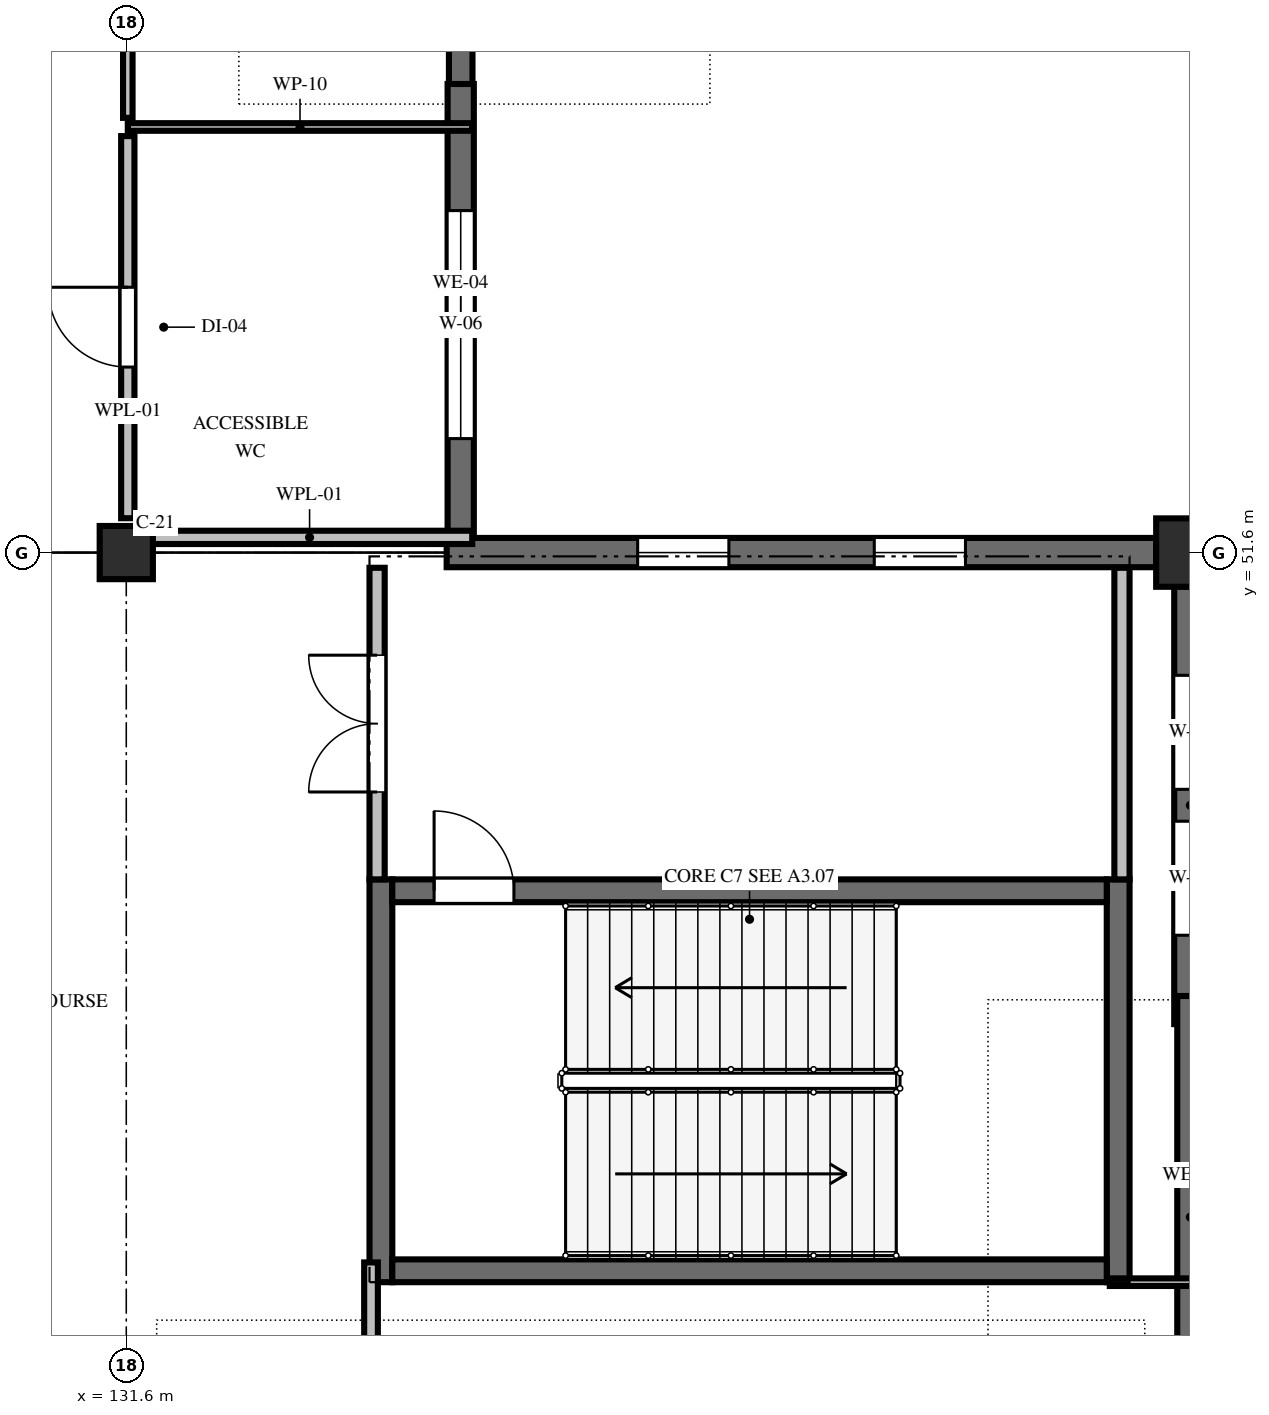
"""IFC4 building model, lengths in metres.
Left out: names, types, materials, properties, quantities, classifications, styles, units other than length and angle.
Written with IfcOpenShell. Run it as: python <this file> out.ifc"""

import sys

from ifc_helpers import new_model, si_unit, direction, frame, frame_2d, origin, origin_2d, place, context, subcontext, project, spatial, rectangle, hollow_rectangle, extrude, element, fill, save


model = new_model("IFC4")
c1 = context("Model", 3, precision=1e-05, world=origin(), true_north=direction((0.0, 1.0)))
c2 = subcontext(c1, "Body", "Model", "MODEL_VIEW")
j1 = project(units=[si_unit("LENGTHUNIT", "METRE"), si_unit("PLANEANGLEUNIT", "RADIAN")], contexts=[c1])
p1 = place(None, origin())
s1 = spatial("IfcSite", under=j1, at=p1, CompositionType="ELEMENT")
p2 = place(p1, origin())
s2 = spatial("IfcBuilding", under=s1, at=p2, CompositionType="ELEMENT")
p3 = place(p2, origin())
s3 = spatial("IfcBuildingStorey", under=s2, at=p3, CompositionType="ELEMENT", Elevation=0.0)
p4 = place(p3, frame((131.6, 51.6, 0.0), z_axis=(0.0, 0.0, 1.0), x_axis=(1.0, 0.0, 0.0)))
e1 = element("IfcColumn", 1, at=p4, inside=s3, PredefinedType="COLUMN", context=c2, shape_type="SweptSolid", body=[
    extrude(hollow_rectangle(XDim=0.7, YDim=0.7, WallThickness=0.028, InnerFilletRadius=0.028, OuterFilletRadius=0.056, at=origin_2d()), origin(), (0.0, 0.0, 1.0), 5.4),
])
p5 = place(p3, frame((145.6, 51.6, 0.0), z_axis=(0.0, 0.0, 1.0), x_axis=(1.0, 0.0, 0.0)))
e2 = element("IfcColumn", 2, at=p5, inside=s3, PredefinedType="COLUMN", context=c2, shape_type="SweptSolid", body=[
    extrude(hollow_rectangle(XDim=0.9, YDim=0.9, WallThickness=0.036, InnerFilletRadius=0.036, OuterFilletRadius=0.072, at=origin_2d()), origin(), (0.0, 0.0, 1.0), 5.4),
])
p6 = place(p3, frame((136.0, 63.749, 0.0), z_axis=(0.0, 0.0, 1.0), x_axis=(0.0, -1.0, 0.0)))
e3 = element("IfcWall", 3, at=p6, inside=s3, PredefinedType="SOLIDWALL", context=c2, shape_type="SweptSolid", body=[
    extrude(rectangle(XDim=6.298, YDim=0.31, at=frame_2d((3.149, 0.0))), origin(), (0.0, 0.0, 1.0), 3.468),
])
p7 = place(p6, frame((1.799, 0.0, 0.9)))
e4 = element("IfcOpeningElement", 4, at=p7, cuts=e3, PredefinedType="OPENING", context=c2, shape_type="SweptSolid", body=[
    extrude(rectangle(XDim=2.7, YDim=2.0, at=frame_2d((1.35, 1.0))), frame((0.0, 0.165, 0.0), z_axis=(0.0, -1.0, 0.0), x_axis=(1.0, 0.0, 0.0)), (0.0, 0.0, 1.0), 0.33),
])
p8 = place(p3, frame((136.0, 57.766, 0.0), z_axis=(0.0, 0.0, 1.0), x_axis=(0.0, -1.0, 0.0)))
e5 = element("IfcWall", 5, at=p8, inside=s3, PredefinedType="SOLIDWALL", context=c2, shape_type="SweptSolid", body=[
    extrude(rectangle(XDim=6.331, YDim=0.345, at=frame_2d((3.166, 0.0))), origin(), (0.0, 0.0, 1.0), 3.468),
])
p9 = place(p8, frame((1.666, 0.0, 0.9)))
e6 = element("IfcOpeningElement", 6, at=p9, cuts=e5, PredefinedType="OPENING", context=c2, shape_type="SweptSolid", body=[
    extrude(rectangle(XDim=3.0, YDim=1.4, at=frame_2d((1.5, 0.7))), frame((0.0, 0.182, 0.0), z_axis=(0.0, -1.0, 0.0), x_axis=(1.0, 0.0, 0.0)), (0.0, 0.0, 1.0), 0.365),
])
p10 = place(p3, frame((135.815, 51.6, 0.0), z_axis=(0.0, 0.0, 1.0), x_axis=(1.0, 0.0, 0.0)))
e7 = element("IfcWall", 7, at=p10, inside=s3, PredefinedType="SOLIDWALL", context=c2, shape_type="SweptSolid", body=[
    extrude(rectangle(XDim=9.339, YDim=0.385, at=frame_2d((4.669, 0.0))), origin(), (0.0, 0.0, 1.0), 3.468),
])
p11 = place(p10, frame((2.513, 0.0, 0.9)))
e8 = element("IfcOpeningElement", 8, at=p11, cuts=e7, PredefinedType="OPENING", context=c2, shape_type="SweptSolid", body=[
    extrude(rectangle(XDim=1.2, YDim=1.5, at=frame_2d((0.6, 0.75))), frame((0.0, 0.202, 0.0), z_axis=(0.0, -1.0, 0.0), x_axis=(1.0, 0.0, 0.0)), (0.0, 0.0, 1.0), 0.405),
])
p12 = place(p10, frame((5.626, 0.0, 0.9)))
e9 = element("IfcOpeningElement", 9, at=p12, cuts=e7, PredefinedType="OPENING", context=c2, shape_type="SweptSolid", body=[
    extrude(rectangle(XDim=1.2, YDim=1.5, at=frame_2d((0.6, 0.75))), frame((0.0, 0.202, 0.0), z_axis=(0.0, -1.0, 0.0), x_axis=(1.0, 0.0, 0.0)), (0.0, 0.0, 1.0), 0.405),
])
p13 = place(p3, frame((145.6, 51.154, 0.0), z_axis=(0.0, 0.0, 1.0), x_axis=(0.0, -1.0, 0.0)))
e10 = element("IfcWall", 10, at=p13, inside=s3, PredefinedType="SOLIDWALL", context=c2, shape_type="SweptSolid", body=[
    extrude(rectangle(XDim=5.758, YDim=0.425, at=frame_2d((2.879, 0.0))), origin(), (0.0, 0.0, 1.0), 3.468),
])
p14 = place(p13, frame((1.169, 0.0, 0.9)))
e11 = element("IfcOpeningElement", 11, at=p14, cuts=e10, PredefinedType="OPENING", context=c2, shape_type="SweptSolid", body=[
    extrude(rectangle(XDim=1.5, YDim=1.5, at=frame_2d((0.75, 0.75))), frame((0.0, 0.222, 0.0), z_axis=(0.0, -1.0, 0.0), x_axis=(1.0, 0.0, 0.0)), (0.0, 0.0, 1.0), 0.445),
])
p15 = place(p13, frame((3.089, 0.0, 0.9)))
e12 = element("IfcOpeningElement", 12, at=p15, cuts=e10, PredefinedType="OPENING", context=c2, shape_type="SweptSolid", body=[
    extrude(rectangle(XDim=1.5, YDim=1.5, at=frame_2d((0.75, 0.75))), frame((0.0, 0.222, 0.0), z_axis=(0.0, -1.0, 0.0), x_axis=(1.0, 0.0, 0.0)), (0.0, 0.0, 1.0), 0.445),
])
p16 = place(p3, frame((145.6, 45.766, 0.0), z_axis=(0.0, 0.0, 1.0), x_axis=(0.0, -1.0, 0.0)))
e13 = element("IfcWall", 13, at=p16, inside=s3, PredefinedType="SOLIDWALL", context=c2, shape_type="SweptSolid", body=[
    extrude(rectangle(XDim=5.82, YDim=0.345, at=frame_2d((2.91, 0.0))), origin(), (0.0, 0.0, 1.0), 3.468),
])
for number, where, z_axis, x_axis in (
    (14, (134.95, 42.0, 0.0), (0.0, 0.0, 1.0), (0.0, 1.0, 0.0)),
    (15, (144.65, 47.3, 0.0), (0.0, 0.0, 1.0), (0.0, -1.0, 0.0)),
):
    element("IfcWall", number, at=place(p3, frame(where, z_axis=z_axis, x_axis=x_axis)), inside=s3, PredefinedType="SHEAR", context=c2, shape_type="SweptSolid", body=[
        extrude(rectangle(XDim=5.3, YDim=0.3, at=frame_2d((2.65, 0.0))), origin(), (0.0, 0.0, 1.0), 5.17),
    ])
p17 = place(p3, frame((144.5, 42.15, 0.0), z_axis=(0.0, 0.0, 1.0), x_axis=(-1.0, 0.0, 0.0)))
e16 = element("IfcWall", 16, at=p17, inside=s3, PredefinedType="SHEAR", context=c2, shape_type="SweptSolid", body=[
    extrude(rectangle(XDim=9.4, YDim=0.3, at=frame_2d((4.7, 0.0))), origin(), (0.0, 0.0, 1.0), 5.17),
])
p18 = place(p3, frame((135.1, 47.15, 0.0), z_axis=(0.0, 0.0, 1.0), x_axis=(1.0, 0.0, 0.0)))
e17 = element("IfcWall", 17, at=p18, inside=s3, PredefinedType="SHEAR", context=c2, shape_type="SweptSolid", body=[
    extrude(rectangle(XDim=9.4, YDim=0.3, at=frame_2d((4.7, 0.0))), origin(), (0.0, 0.0, 1.0), 5.17),
])
p19 = place(p18, frame((0.55, 0.0, 0.0)))
e18 = element("IfcOpeningElement", 18, at=p19, cuts=e17, PredefinedType="OPENING", context=c2, shape_type="SweptSolid", body=[
    extrude(rectangle(XDim=1.05, YDim=2.2, at=frame_2d((0.525, 1.1))), frame((0.0, 0.16, 0.0), z_axis=(0.0, -1.0, 0.0), x_axis=(1.0, 0.0, 0.0)), (0.0, 0.0, 1.0), 0.32),
])
p20 = place(p3, frame((134.9, 47.3, 0.0), z_axis=(0.0, 0.0, 1.0), x_axis=(0.0, 1.0, 0.0)))
e19 = element("IfcWall", 19, at=p20, inside=s3, PredefinedType="SOLIDWALL", context=c2, shape_type="SweptSolid", body=[
    extrude(rectangle(XDim=4.1, YDim=0.2, at=frame_2d((2.05, 0.0))), origin(), (0.0, 0.0, 1.0), 5.05),
])
p21 = place(p20, frame((1.15, 0.0, 0.0)))
e20 = element("IfcOpeningElement", 20, at=p21, cuts=e19, PredefinedType="OPENING", context=c2, shape_type="SweptSolid", body=[
    extrude(rectangle(XDim=1.8, YDim=2.2, at=frame_2d((0.9, 1.1))), frame((0.0, 0.11, 0.0), z_axis=(0.0, -1.0, 0.0), x_axis=(1.0, 0.0, 0.0)), (0.0, 0.0, 1.0), 0.22),
])
p22 = place(p3, frame((144.7, 47.3, 0.0), z_axis=(0.0, 0.0, 1.0), x_axis=(0.0, 1.0, 0.0)))
e21 = element("IfcWall", 21, at=p22, inside=s3, PredefinedType="SOLIDWALL", context=c2, shape_type="SweptSolid", body=[
    extrude(rectangle(XDim=4.1, YDim=0.2, at=frame_2d((2.05, 0.0))), origin(), (0.0, 0.0, 1.0), 5.05),
])
p23 = place(p3, frame((134.82, 32.6, 0.0), z_axis=(0.0, 0.0, 1.0), x_axis=(0.0, 1.0, 0.0)))
e22 = element("IfcWall", 22, at=p23, inside=s3, PredefinedType="PARTITIONING", context=c2, shape_type="SweptSolid", body=[
    extrude(rectangle(XDim=9.66, YDim=0.18, at=frame_2d((4.83, 0.0))), origin(), (0.0, 0.0, 1.0), 3.47),
])
p24 = place(p23, frame((4.03, 0.0, 0.0)))
e23 = element("IfcOpeningElement", 23, at=p24, cuts=e22, PredefinedType="OPENING", context=c2, shape_type="SweptSolid", body=[
    extrude(rectangle(XDim=1.6, YDim=2.2, at=frame_2d((0.8, 1.1))), frame((0.0, 0.1, 0.0), z_axis=(0.0, -1.0, 0.0), x_axis=(1.0, 0.0, 0.0)), (0.0, 0.0, 1.0), 0.2),
])
p25 = place(p3, frame((144.54, 42.0, 0.0), z_axis=(0.0, 0.0, 1.0), x_axis=(1.0, 0.0, 0.0)))
e24 = element("IfcWall", 24, at=p25, inside=s3, PredefinedType="PARTITIONING", context=c2, shape_type="SweptSolid", body=[
    extrude(rectangle(XDim=1.211, YDim=0.1, at=frame_2d((0.606, 0.0))), origin(), (0.0, 0.0, 1.0), 4.37),
])
p26 = place(p3, frame((136.152, 57.2, 0.0), z_axis=(0.0, 0.0, 1.0), x_axis=(-1.0, 0.0, 0.0)))
e25 = element("IfcWall", 25, at=p26, inside=s3, PredefinedType="PARTITIONING", context=c2, shape_type="SweptSolid", body=[
    extrude(rectangle(XDim=4.531, YDim=0.1, at=frame_2d((2.266, 0.0))), origin(), (0.0, 0.0, 1.0), 4.37),
])
p27 = place(p3, frame((131.62, 57.32, 0.0), z_axis=(0.0, 0.0, 1.0), x_axis=(0.0, 1.0, 0.0)))
e26 = element("IfcWall", 26, at=p27, inside=s3, PredefinedType="PARTITIONING", context=c2, shape_type="SweptSolid", body=[
    extrude(rectangle(XDim=13.26, YDim=0.125, at=frame_2d((6.63, 0.0))), origin(), (0.0, 0.0, 1.0), 3.47),
])
p28 = place(p27, frame((7.019, 0.0, 0.0)))
e27 = element("IfcOpeningElement", 27, at=p28, cuts=e26, PredefinedType="OPENING", context=c2, shape_type="SweptSolid", body=[
    extrude(rectangle(XDim=1.0, YDim=2.15, at=frame_2d((0.5, 1.075))), frame((0.0, 0.073, 0.0), z_axis=(0.0, -1.0, 0.0), x_axis=(1.0, 0.0, 0.0)), (0.0, 0.0, 1.0), 0.145),
])
p29 = place(p3, frame((136.152, 51.8, 0.0), z_axis=(0.0, 0.0, 1.0), x_axis=(-1.0, 0.0, 0.0)))
e28 = element("IfcWall", 28, at=p29, inside=s3, PredefinedType="PLUMBINGWALL", context=c2, shape_type="SweptSolid", body=[
    extrude(rectangle(XDim=4.28, YDim=0.175, at=frame_2d((2.14, 0.0))), origin(), (0.0, 0.0, 1.0), 3.47),
])
p30 = place(p3, frame((131.62, 52.052, 0.0), z_axis=(0.0, 0.0, 1.0), x_axis=(0.0, 1.0, 0.0)))
e29 = element("IfcWall", 29, at=p30, inside=s3, PredefinedType="PLUMBINGWALL", context=c2, shape_type="SweptSolid", body=[
    extrude(rectangle(XDim=5.028, YDim=0.175, at=frame_2d((2.514, 0.0))), origin(), (0.0, 0.0, 1.0), 3.47),
])
p31 = place(p30, frame((1.989, 0.0, 0.0)))
e30 = element("IfcOpeningElement", 30, at=p31, cuts=e29, PredefinedType="OPENING", context=c2, shape_type="SweptSolid", body=[
    extrude(rectangle(XDim=1.05, YDim=2.15, at=frame_2d((0.525, 1.075))), frame((0.0, 0.097, 0.0), z_axis=(0.0, -1.0, 0.0), x_axis=(1.0, 0.0, 0.0)), (0.0, 0.0, 1.0), 0.195),
])
p32 = place(p9, origin())
e31 = element("IfcWindow", 31, at=p32, inside=s3, PartitioningType="TRIPLE_PANEL_VERTICAL", PredefinedType="WINDOW", context=c2, shape_type="SweptSolid", body=[
    extrude(rectangle(XDim=3.0, YDim=1.4, at=frame_2d((1.5, 0.7))), frame((0.0, 0.03, 0.0), z_axis=(0.0, -1.0, 0.0), x_axis=(1.0, 0.0, 0.0)), (0.0, 0.0, 1.0), 0.06),
])
fill(e6, e31)
p33 = place(p11, origin())
e32 = element("IfcWindow", 32, at=p33, inside=s3, PartitioningType="DOUBLE_PANEL_VERTICAL", PredefinedType="WINDOW", context=c2, shape_type="SweptSolid", body=[
    extrude(rectangle(XDim=1.2, YDim=1.5, at=frame_2d((0.6, 0.75))), frame((0.0, 0.03, 0.0), z_axis=(0.0, -1.0, 0.0), x_axis=(1.0, 0.0, 0.0)), (0.0, 0.0, 1.0), 0.06),
])
fill(e8, e32)
p34 = place(p12, origin())
e33 = element("IfcWindow", 33, at=p34, inside=s3, PartitioningType="DOUBLE_PANEL_VERTICAL", PredefinedType="WINDOW", context=c2, shape_type="SweptSolid", body=[
    extrude(rectangle(XDim=1.2, YDim=1.5, at=frame_2d((0.6, 0.75))), frame((0.0, 0.03, 0.0), z_axis=(0.0, -1.0, 0.0), x_axis=(1.0, 0.0, 0.0)), (0.0, 0.0, 1.0), 0.06),
])
fill(e9, e33)
p35 = place(p14, origin())
e34 = element("IfcWindow", 34, at=p35, inside=s3, PartitioningType="DOUBLE_PANEL_VERTICAL", PredefinedType="WINDOW", context=c2, shape_type="SweptSolid", body=[
    extrude(rectangle(XDim=1.5, YDim=1.5, at=frame_2d((0.75, 0.75))), frame((0.0, 0.03, 0.0), z_axis=(0.0, -1.0, 0.0), x_axis=(1.0, 0.0, 0.0)), (0.0, 0.0, 1.0), 0.06),
])
fill(e11, e34)
p36 = place(p15, origin())
e35 = element("IfcWindow", 35, at=p36, inside=s3, PartitioningType="DOUBLE_PANEL_VERTICAL", PredefinedType="WINDOW", context=c2, shape_type="SweptSolid", body=[
    extrude(rectangle(XDim=1.5, YDim=1.5, at=frame_2d((0.75, 0.75))), frame((0.0, 0.03, 0.0), z_axis=(0.0, -1.0, 0.0), x_axis=(1.0, 0.0, 0.0)), (0.0, 0.0, 1.0), 0.06),
])
fill(e12, e35)
p37 = place(p19, origin())
e36 = element("IfcDoor", 36, at=p37, inside=s3, OperationType="SINGLE_SWING_LEFT", PredefinedType="DOOR", context=c2, shape_type="SweptSolid", body=[
    extrude(rectangle(XDim=1.05, YDim=2.2, at=frame_2d((0.525, 1.1))), frame((0.0, 0.025, 0.0), z_axis=(0.0, -1.0, 0.0), x_axis=(1.0, 0.0, 0.0)), (0.0, 0.0, 1.0), 0.05),
])
fill(e18, e36)
p38 = place(p21, origin())
e37 = element("IfcDoor", 37, at=p38, inside=s3, OperationType="DOUBLE_DOOR_SINGLE_SWING", PredefinedType="DOOR", context=c2, shape_type="SweptSolid", body=[
    extrude(rectangle(XDim=1.8, YDim=2.2, at=frame_2d((0.9, 1.1))), frame((0.0, 0.025, 0.0), z_axis=(0.0, -1.0, 0.0), x_axis=(1.0, 0.0, 0.0)), (0.0, 0.0, 1.0), 0.05),
])
fill(e20, e37)
p39 = place(p31, origin())
e38 = element("IfcDoor", 38, at=p39, inside=s3, OperationType="SINGLE_SWING_RIGHT", PredefinedType="DOOR", context=c2, shape_type="SweptSolid", body=[
    extrude(rectangle(XDim=1.05, YDim=2.15, at=frame_2d((0.525, 1.075))), frame((0.0, 0.025, 0.0), z_axis=(0.0, -1.0, 0.0), x_axis=(1.0, 0.0, 0.0)), (0.0, 0.0, 1.0), 0.05),
])
fill(e30, e38)
save(model, sys.argv[1])
